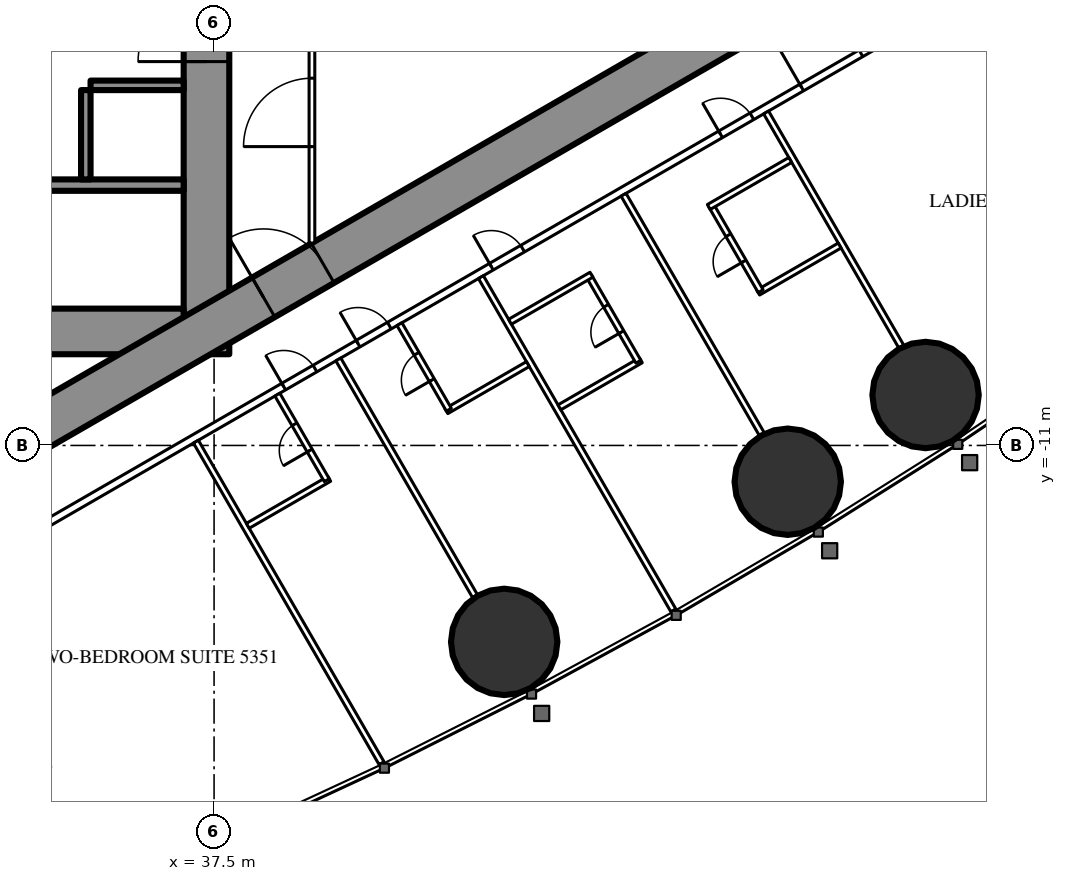
"""IFC4 building model, lengths in metres.
Left out: names, types, materials, properties, quantities, classifications, styles, units other than length and angle.
Written with IfcOpenShell. Run it as: python <this file> out.ifc"""

import sys

from ifc_helpers import new_model, si_unit, direction, frame, frame_2d, origin, origin_2d, place, context, subcontext, project, spatial, rectangle, circle, extrude, element, fill, save


model = new_model("IFC4")
c1 = context("Model", 3, precision=1e-05, world=origin(), true_north=direction((0.0, 1.0)))
c2 = subcontext(c1, "Body", "Model", "MODEL_VIEW")
j1 = project(units=[si_unit("LENGTHUNIT", "METRE"), si_unit("PLANEANGLEUNIT", "RADIAN")], contexts=[c1])
p1 = place(None, origin())
s1 = spatial("IfcSite", under=j1, at=p1, CompositionType="ELEMENT")
p2 = place(p1, origin())
s2 = spatial("IfcBuilding", under=s1, at=p2, CompositionType="ELEMENT")
p3 = place(p2, frame((0.0, 0.0, 198.3)))
s3 = spatial("IfcBuildingStorey", under=s2, at=p3, CompositionType="ELEMENT", Elevation=198.3)
for number, where, z_axis, x_axis in (
    (1, (45.134, -16.168, 0.0), (0.0, 0.0, 1.0), (1.0, 0.0, 0.0)),
    (2, (52.594, -11.955, 0.0), (0.0, 0.0, 1.0), (1.0, 0.0, 0.0)),
    (3, (56.221, -9.672, 0.0), (0.0, 0.0, 1.0), (1.0, 0.0, 0.0)),
):
    element("IfcColumn", number, at=place(p3, frame(where, z_axis=z_axis, x_axis=x_axis)), inside=s3, PredefinedType="COLUMN", context=c2, shape_type="SweptSolid", body=[
        extrude(circle(Radius=1.4, at=origin_2d()), origin(), (0.0, 0.0, 1.0), 3.5),
    ])
p4 = place(p3, frame((37.3, -8.6, 0.0), z_axis=(0.0, 0.0, 1.0), x_axis=(0.0, 1.0, 0.0)))
e4 = element("IfcWall", 4, at=p4, inside=s3, PredefinedType="SHEAR", context=c2, shape_type="SweptSolid", body=[
    extrude(rectangle(XDim=17.2, YDim=1.2, at=frame_2d((8.6, 0.0))), origin(), (0.0, 0.0, 1.0), 3.5),
])
p5 = place(p4, frame((7.7, 0.0, 0.0)))
e5 = element("IfcOpeningElement", 5, at=p5, cuts=e4, PredefinedType="OPENING", context=c2, shape_type="SweptSolid", body=[
    extrude(rectangle(XDim=1.8, YDim=2.2, at=frame_2d((0.9, 1.1))), frame((0.0, 0.61, 0.0), z_axis=(0.0, -1.0, 0.0), x_axis=(1.0, 0.0, 0.0)), (0.0, 0.0, 1.0), 1.22),
])
p6 = place(p3, frame((28.3, -8.0, 0.0), z_axis=(0.0, 0.0, 1.0), x_axis=(1.0, 0.0, 0.0)))
e6 = element("IfcWall", 6, at=p6, inside=s3, PredefinedType="SHEAR", context=c2, shape_type="SweptSolid", body=[
    extrude(rectangle(XDim=8.4, YDim=1.2, at=frame_2d((4.2, 0.0))), origin(), (0.0, 0.0, 1.0), 3.5),
])
p7 = place(p6, frame((0.25, 0.0, 0.0)))
e7 = element("IfcOpeningElement", 7, at=p7, cuts=e6, PredefinedType="OPENING", context=c2, shape_type="SweptSolid", body=[
    extrude(rectangle(XDim=1.0, YDim=2.2, at=frame_2d((0.5, 1.1))), frame((0.0, 0.61, 0.0), z_axis=(0.0, -1.0, 0.0), x_axis=(1.0, 0.0, 0.0)), (0.0, 0.0, 1.0), 1.22),
])
p8 = place(p3, frame((28.3, -4.15, 0.0), z_axis=(0.0, 0.0, 1.0), x_axis=(1.0, 0.0, 0.0)))
e8 = element("IfcWall", 8, at=p8, inside=s3, PredefinedType="SHEAR", context=c2, shape_type="SweptSolid", body=[
    extrude(rectangle(XDim=8.4, YDim=0.3, at=frame_2d((4.2, 0.0))), origin(), (0.0, 0.0, 1.0), 3.5),
])
p9 = place(p3, frame((34.125, -4.0, 0.0), z_axis=(0.0, 0.0, 1.0), x_axis=(0.0, 1.0, 0.0)))
e9 = element("IfcWall", 9, at=p9, inside=s3, PredefinedType="SHEAR", context=c2, shape_type="SweptSolid", body=[
    extrude(rectangle(XDim=2.35, YDim=0.25, at=frame_2d((1.175, 0.0))), origin(), (0.0, 0.0, 1.0), 3.5),
])
p10 = place(p3, frame((34.25, -1.525, 0.0), z_axis=(0.0, 0.0, 1.0), x_axis=(1.0, 0.0, 0.0)))
e10 = element("IfcWall", 10, at=p10, inside=s3, PredefinedType="SHEAR", context=c2, shape_type="SweptSolid", body=[
    extrude(rectangle(XDim=2.45, YDim=0.25, at=frame_2d((1.225, 0.0))), origin(), (0.0, 0.0, 1.0), 3.5),
])
p11 = place(p3, frame((27.2, -13.8, 0.0), z_axis=(0.0, 0.0, 1.0), x_axis=(0.866027159892, 0.499996958321, 0.0)))
e11 = element("IfcWall", 11, at=p11, inside=s3, PredefinedType="SHEAR", context=c2, shape_type="SweptSolid", body=[
    extrude(rectangle(XDim=27.947, YDim=1.2, at=frame_2d((13.973, 0.0))), origin(), (0.0, 0.0, 1.0), 3.5),
])
p12 = place(p11, frame((4.6, 0.0, 0.0)))
e12 = element("IfcOpeningElement", 12, at=p12, cuts=e11, PredefinedType="OPENING", context=c2, shape_type="SweptSolid", body=[
    extrude(rectangle(XDim=1.0, YDim=2.2, at=frame_2d((0.5, 1.1))), frame((0.0, 0.61, 0.0), z_axis=(0.0, -1.0, 0.0), x_axis=(1.0, 0.0, 0.0)), (0.0, 0.0, 1.0), 1.22),
])
p13 = place(p11, frame((13.395, 0.0, 0.0)))
e13 = element("IfcOpeningElement", 13, at=p13, cuts=e11, PredefinedType="OPENING", context=c2, shape_type="SweptSolid", body=[
    extrude(rectangle(XDim=1.8, YDim=2.2, at=frame_2d((0.9, 1.1))), frame((0.0, 0.61, 0.0), z_axis=(0.0, -1.0, 0.0), x_axis=(1.0, 0.0, 0.0)), (0.0, 0.0, 1.0), 1.22),
])
p14 = place(p3, frame((27.959, -16.017, 0.0), z_axis=(0.0, 0.0, 1.0), x_axis=(0.866024151371, 0.500002169237, 0.0)))
e14 = element("IfcWall", 14, at=p14, inside=s3, PredefinedType="PARTITIONING", context=c2, shape_type="SweptSolid", body=[
    extrude(rectangle(XDim=32.034, YDim=0.2, at=frame_2d((16.017, 0.0))), origin(), (0.0, 0.0, 1.0), 3.25),
])
p15 = place(p14, frame((0.6, 0.0, 0.0)))
e15 = element("IfcOpeningElement", 15, at=p15, cuts=e14, PredefinedType="OPENING", context=c2, shape_type="SweptSolid", body=[
    extrude(rectangle(XDim=0.95, YDim=2.2, at=frame_2d((0.475, 1.1))), frame((0.0, 0.11, 0.0), z_axis=(0.0, -1.0, 0.0), x_axis=(1.0, 0.0, 0.0)), (0.0, 0.0, 1.0), 0.22),
])
p16 = place(p14, frame((13.132, 0.0, 0.0)))
e16 = element("IfcOpeningElement", 16, at=p16, cuts=e14, PredefinedType="OPENING", context=c2, shape_type="SweptSolid", body=[
    extrude(rectangle(XDim=0.95, YDim=2.2, at=frame_2d((0.475, 1.1))), frame((0.0, 0.11, 0.0), z_axis=(0.0, -1.0, 0.0), x_axis=(1.0, 0.0, 0.0)), (0.0, 0.0, 1.0), 0.22),
])
p17 = place(p14, frame((15.391, 0.0, 0.0)))
e17 = element("IfcOpeningElement", 17, at=p17, cuts=e14, PredefinedType="OPENING", context=c2, shape_type="SweptSolid", body=[
    extrude(rectangle(XDim=0.95, YDim=2.2, at=frame_2d((0.475, 1.1))), frame((0.0, 0.11, 0.0), z_axis=(0.0, -1.0, 0.0), x_axis=(1.0, 0.0, 0.0)), (0.0, 0.0, 1.0), 0.22),
])
p18 = place(p14, frame((19.441, 0.0, 0.0)))
e18 = element("IfcOpeningElement", 18, at=p18, cuts=e14, PredefinedType="OPENING", context=c2, shape_type="SweptSolid", body=[
    extrude(rectangle(XDim=0.95, YDim=2.2, at=frame_2d((0.475, 1.1))), frame((0.0, 0.11, 0.0), z_axis=(0.0, -1.0, 0.0), x_axis=(1.0, 0.0, 0.0)), (0.0, 0.0, 1.0), 0.22),
])
p19 = place(p14, frame((26.406, 0.0, 0.0)))
e19 = element("IfcOpeningElement", 19, at=p19, cuts=e14, PredefinedType="OPENING", context=c2, shape_type="SweptSolid", body=[
    extrude(rectangle(XDim=0.95, YDim=2.2, at=frame_2d((0.475, 1.1))), frame((0.0, 0.11, 0.0), z_axis=(0.0, -1.0, 0.0), x_axis=(1.0, 0.0, 0.0)), (0.0, 0.0, 1.0), 0.22),
])
p20 = place(p14, frame((28.87, 0.0, 0.0)))
e20 = element("IfcOpeningElement", 20, at=p20, cuts=e14, PredefinedType="OPENING", context=c2, shape_type="SweptSolid", body=[
    extrude(rectangle(XDim=1.8, YDim=2.2, at=frame_2d((0.9, 1.1))), frame((0.0, 0.11, 0.0), z_axis=(0.0, -1.0, 0.0), x_axis=(1.0, 0.0, 0.0)), (0.0, 0.0, 1.0), 0.22),
])
p21 = place(p3, frame((37.022, -10.9, 0.0), z_axis=(0.0, 0.0, 1.0), x_axis=(0.499998620953, -0.866026199976, 0.0)))
e21 = element("IfcWall", 21, at=p21, inside=s3, PredefinedType="PARTITIONING", context=c2, shape_type="SweptSolid", body=[
    extrude(rectangle(XDim=9.77, YDim=0.15, at=frame_2d((4.885, 0.0))), origin(), (0.0, 0.0, 1.0), 3.25),
])
p22 = place(p3, frame((40.769, -8.737, 0.0), z_axis=(0.0, 0.0, 1.0), x_axis=(0.500013115284, -0.866017831539, 0.0)))
e22 = element("IfcWall", 22, at=p22, inside=s3, PredefinedType="PARTITIONING", context=c2, shape_type="SweptSolid", body=[
    extrude(rectangle(XDim=7.198, YDim=0.15, at=frame_2d((3.599, 0.0))), origin(), (0.0, 0.0, 1.0), 2.3),
])
p23 = place(p3, frame((44.521, -6.571, 0.0), z_axis=(0.0, 0.0, 1.0), x_axis=(0.500010457486, -0.866019366068, 0.0)))
e23 = element("IfcWall", 23, at=p23, inside=s3, PredefinedType="PARTITIONING", context=c2, shape_type="SweptSolid", body=[
    extrude(rectangle(XDim=10.126, YDim=0.15, at=frame_2d((5.063, 0.0))), origin(), (0.0, 0.0, 1.0), 3.25),
])
p24 = place(p3, frame((48.275, -4.404, 0.0), z_axis=(0.0, 0.0, 1.0), x_axis=(0.500006004368, -0.866021937133, 0.0)))
e24 = element("IfcWall", 24, at=p24, inside=s3, PredefinedType="PARTITIONING", context=c2, shape_type="SweptSolid", body=[
    extrude(rectangle(XDim=7.279, YDim=0.15, at=frame_2d((3.64, 0.0))), origin(), (0.0, 0.0, 1.0), 2.3),
])
p25 = place(p3, frame((52.025, -2.238, 0.0), z_axis=(0.0, 0.0, 1.0), x_axis=(0.499983785035, -0.866034765296, 0.0)))
e25 = element("IfcWall", 25, at=p25, inside=s3, PredefinedType="PARTITIONING", context=c2, shape_type="SweptSolid", body=[
    extrude(rectangle(XDim=7.116, YDim=0.15, at=frame_2d((3.558, 0.0))), origin(), (0.0, 0.0, 1.0), 2.3),
])
p26 = place(p3, frame((38.387, -13.115, 0.0), z_axis=(0.0, 0.0, 1.0), x_axis=(0.866073894602, 0.499916002032, 0.0)))
e26 = element("IfcWall", 26, at=p26, inside=s3, PredefinedType="PARTITIONING", context=c2, shape_type="SweptSolid", body=[
    extrude(rectangle(XDim=2.475, YDim=0.15, at=frame_2d((1.238, 0.0))), origin(), (0.0, 0.0, 1.0), 3.25),
])
p27 = place(p3, frame((39.166, -9.663, 0.0), z_axis=(0.0, 0.0, 1.0), x_axis=(0.500006934395, -0.866021400173, 0.0)))
e27 = element("IfcWall", 27, at=p27, inside=s3, PredefinedType="PARTITIONING", context=c2, shape_type="SweptSolid", body=[
    extrude(rectangle(XDim=2.6, YDim=0.15, at=frame_2d((1.3, 0.0))), origin(), (0.0, 0.0, 1.0), 3.25),
])
p28 = place(p27, frame((0.9, 0.0, 0.0)))
e28 = element("IfcOpeningElement", 28, at=p28, cuts=e27, PredefinedType="OPENING", context=c2, shape_type="SweptSolid", body=[
    extrude(rectangle(XDim=0.8, YDim=2.2, at=frame_2d((0.4, 1.1))), frame((0.0, 0.085, 0.0), z_axis=(0.0, -1.0, 0.0), x_axis=(1.0, 0.0, 0.0)), (0.0, 0.0, 1.0), 0.17),
])
p29 = place(p3, frame((43.613, -10.097, 0.0), z_axis=(0.0, 0.0, 1.0), x_axis=(0.866031185235, 0.4999899861, 0.0)))
e29 = element("IfcWall", 29, at=p29, inside=s3, PredefinedType="PARTITIONING", context=c2, shape_type="SweptSolid", body=[
    extrude(rectangle(XDim=2.475, YDim=0.15, at=frame_2d((1.238, 0.0))), origin(), (0.0, 0.0, 1.0), 3.25),
])
p30 = place(p3, frame((42.378, -7.808, 0.0), z_axis=(0.0, 0.0, 1.0), x_axis=(0.500006934395, -0.866021400173, 0.0)))
e30 = element("IfcWall", 30, at=p30, inside=s3, PredefinedType="PARTITIONING", context=c2, shape_type="SweptSolid", body=[
    extrude(rectangle(XDim=2.6, YDim=0.15, at=frame_2d((1.3, 0.0))), origin(), (0.0, 0.0, 1.0), 3.25),
])
p31 = place(p30, frame((0.9, 0.0, 0.0)))
e31 = element("IfcOpeningElement", 31, at=p31, cuts=e30, PredefinedType="OPENING", context=c2, shape_type="SweptSolid", body=[
    extrude(rectangle(XDim=0.8, YDim=2.2, at=frame_2d((0.4, 1.1))), frame((0.0, 0.085, 0.0), z_axis=(0.0, -1.0, 0.0), x_axis=(1.0, 0.0, 0.0)), (0.0, 0.0, 1.0), 0.17),
])
p32 = place(p3, frame((46.586, -9.997, 0.0), z_axis=(0.0, 0.0, 1.0), x_axis=(0.866006523861, 0.500032699561, 0.0)))
e32 = element("IfcWall", 32, at=p32, inside=s3, PredefinedType="PARTITIONING", context=c2, shape_type="SweptSolid", body=[
    extrude(rectangle(XDim=2.475, YDim=0.15, at=frame_2d((1.237, 0.0))), origin(), (0.0, 0.0, 1.0), 3.25),
])
p33 = place(p3, frame((47.365, -6.546, 0.0), z_axis=(0.0, 0.0, 1.0), x_axis=(0.500006934395, -0.866021400173, 0.0)))
e33 = element("IfcWall", 33, at=p33, inside=s3, PredefinedType="PARTITIONING", context=c2, shape_type="SweptSolid", body=[
    extrude(rectangle(XDim=2.6, YDim=0.15, at=frame_2d((1.3, 0.0))), origin(), (0.0, 0.0, 1.0), 3.25),
])
p34 = place(p33, frame((0.9, 0.0, 0.0)))
e34 = element("IfcOpeningElement", 34, at=p34, cuts=e33, PredefinedType="OPENING", context=c2, shape_type="SweptSolid", body=[
    extrude(rectangle(XDim=0.8, YDim=2.2, at=frame_2d((0.4, 1.1))), frame((0.0, 0.085, 0.0), z_axis=(0.0, -1.0, 0.0), x_axis=(1.0, 0.0, 0.0)), (0.0, 0.0, 1.0), 0.17),
])
for number, where, z_axis, x_axis in (
    (35, (45.286, -7.746, 0.0), (0.0, 0.0, 1.0), (0.866, 0.5, 0.0)),
    (36, (51.817, -6.978, 0.0), (0.0, 0.0, 1.0), (0.866, 0.5, 0.0)),
):
    element("IfcWall", number, at=place(p3, frame(where, z_axis=z_axis, x_axis=x_axis)), inside=s3, PredefinedType="PARTITIONING", context=c2, shape_type="SweptSolid", body=[
        extrude(rectangle(XDim=2.475, YDim=0.15, at=frame_2d((1.237, 0.0))), origin(), (0.0, 0.0, 1.0), 3.25),
    ])
p35 = place(p3, frame((50.582, -4.688, 0.0), z_axis=(0.0, 0.0, 1.0), x_axis=(0.500006934395, -0.866021400173, 0.0)))
e37 = element("IfcWall", 37, at=p35, inside=s3, PredefinedType="PARTITIONING", context=c2, shape_type="SweptSolid", body=[
    extrude(rectangle(XDim=2.6, YDim=0.15, at=frame_2d((1.3, 0.0))), origin(), (0.0, 0.0, 1.0), 3.25),
])
p36 = place(p35, frame((0.9, 0.0, 0.0)))
e38 = element("IfcOpeningElement", 38, at=p36, cuts=e37, PredefinedType="OPENING", context=c2, shape_type="SweptSolid", body=[
    extrude(rectangle(XDim=0.8, YDim=2.2, at=frame_2d((0.4, 1.1))), frame((0.0, 0.085, 0.0), z_axis=(0.0, -1.0, 0.0), x_axis=(1.0, 0.0, 0.0)), (0.0, 0.0, 1.0), 0.17),
])
p37 = place(p3, frame((50.517, -4.726, 0.0), z_axis=(0.0, 0.0, 1.0), x_axis=(0.866031185235, 0.4999899861, 0.0)))
e39 = element("IfcWall", 39, at=p37, inside=s3, PredefinedType="PARTITIONING", context=c2, shape_type="SweptSolid", body=[
    extrude(rectangle(XDim=2.475, YDim=0.15, at=frame_2d((1.238, 0.0))), origin(), (0.0, 0.0, 1.0), 3.25),
])
p38 = place(p3, frame((40.075, -5.674, 0.0), z_axis=(0.0, 0.0, 1.0), x_axis=(0.0, 1.0, 0.0)))
e40 = element("IfcWall", 40, at=p38, inside=s3, PredefinedType="PARTITIONING", context=c2, shape_type="SweptSolid", body=[
    extrude(rectangle(XDim=6.874, YDim=0.15, at=frame_2d((3.437, 0.0))), origin(), (0.0, 0.0, 1.0), 3.25),
])
p39 = place(p38, frame((2.537, 0.0, 0.0)))
e41 = element("IfcOpeningElement", 41, at=p39, cuts=e40, PredefinedType="OPENING", context=c2, shape_type="SweptSolid", body=[
    extrude(rectangle(XDim=1.8, YDim=2.2, at=frame_2d((0.9, 1.1))), frame((0.0, 0.085, 0.0), z_axis=(0.0, -1.0, 0.0), x_axis=(1.0, 0.0, 0.0)), (0.0, 0.0, 1.0), 0.17),
])
p40 = place(p28, origin())
e42 = element("IfcDoor", 42, at=p40, inside=s3, OperationType="SINGLE_SWING_RIGHT", PredefinedType="DOOR", context=c2, shape_type="SweptSolid", body=[
    extrude(rectangle(XDim=0.8, YDim=2.2, at=frame_2d((0.4, 1.1))), frame((0.0, 0.025, 0.0), z_axis=(0.0, -1.0, 0.0), x_axis=(1.0, 0.0, 0.0)), (0.0, 0.0, 1.0), 0.05),
])
fill(e28, e42)
p41 = place(p16, origin())
e43 = element("IfcDoor", 43, at=p41, inside=s3, OperationType="SINGLE_SWING_LEFT", PredefinedType="DOOR", context=c2, shape_type="SweptSolid", body=[
    extrude(rectangle(XDim=0.95, YDim=2.2, at=frame_2d((0.475, 1.1))), frame((0.0, 0.025, 0.0), z_axis=(0.0, -1.0, 0.0), x_axis=(1.0, 0.0, 0.0)), (0.0, 0.0, 1.0), 0.05),
])
fill(e16, e43)
p42 = place(p31, origin())
e44 = element("IfcDoor", 44, at=p42, inside=s3, OperationType="SINGLE_SWING_RIGHT", PredefinedType="DOOR", context=c2, shape_type="SweptSolid", body=[
    extrude(rectangle(XDim=0.8, YDim=2.2, at=frame_2d((0.4, 1.1))), frame((0.0, 0.025, 0.0), z_axis=(0.0, -1.0, 0.0), x_axis=(1.0, 0.0, 0.0)), (0.0, 0.0, 1.0), 0.05),
])
fill(e31, e44)
p43 = place(p17, origin())
e45 = element("IfcDoor", 45, at=p43, inside=s3, OperationType="SINGLE_SWING_LEFT", PredefinedType="DOOR", context=c2, shape_type="SweptSolid", body=[
    extrude(rectangle(XDim=0.95, YDim=2.2, at=frame_2d((0.475, 1.1))), frame((0.0, 0.025, 0.0), z_axis=(0.0, -1.0, 0.0), x_axis=(1.0, 0.0, 0.0)), (0.0, 0.0, 1.0), 0.05),
])
fill(e17, e45)
p44 = place(p34, origin())
e46 = element("IfcDoor", 46, at=p44, inside=s3, OperationType="SINGLE_SWING_RIGHT", PredefinedType="DOOR", context=c2, shape_type="SweptSolid", body=[
    extrude(rectangle(XDim=0.8, YDim=2.2, at=frame_2d((0.4, 1.1))), frame((0.0, 0.025, 0.0), z_axis=(0.0, -1.0, 0.0), x_axis=(1.0, 0.0, 0.0)), (0.0, 0.0, 1.0), 0.05),
])
fill(e34, e46)
p45 = place(p18, origin())
e47 = element("IfcDoor", 47, at=p45, inside=s3, OperationType="SINGLE_SWING_LEFT", PredefinedType="DOOR", context=c2, shape_type="SweptSolid", body=[
    extrude(rectangle(XDim=0.95, YDim=2.2, at=frame_2d((0.475, 1.1))), frame((0.0, 0.025, 0.0), z_axis=(0.0, -1.0, 0.0), x_axis=(1.0, 0.0, 0.0)), (0.0, 0.0, 1.0), 0.05),
])
fill(e18, e47)
p46 = place(p36, origin())
e48 = element("IfcDoor", 48, at=p46, inside=s3, OperationType="SINGLE_SWING_RIGHT", PredefinedType="DOOR", context=c2, shape_type="SweptSolid", body=[
    extrude(rectangle(XDim=0.8, YDim=2.2, at=frame_2d((0.4, 1.1))), frame((0.0, 0.025, 0.0), z_axis=(0.0, -1.0, 0.0), x_axis=(1.0, 0.0, 0.0)), (0.0, 0.0, 1.0), 0.05),
])
fill(e38, e48)
p47 = place(p19, origin())
e49 = element("IfcDoor", 49, at=p47, inside=s3, OperationType="SINGLE_SWING_LEFT", PredefinedType="DOOR", context=c2, shape_type="SweptSolid", body=[
    extrude(rectangle(XDim=0.95, YDim=2.2, at=frame_2d((0.475, 1.1))), frame((0.0, 0.025, 0.0), z_axis=(0.0, -1.0, 0.0), x_axis=(1.0, 0.0, 0.0)), (0.0, 0.0, 1.0), 0.05),
])
fill(e19, e49)
p48 = place(p20, origin())
e50 = element("IfcDoor", 50, at=p48, inside=s3, OperationType="DOUBLE_DOOR_SINGLE_SWING", PredefinedType="DOOR", context=c2, shape_type="SweptSolid", body=[
    extrude(rectangle(XDim=1.8, YDim=2.2, at=frame_2d((0.9, 1.1))), frame((0.0, 0.025, 0.0), z_axis=(0.0, -1.0, 0.0), x_axis=(1.0, 0.0, 0.0)), (0.0, 0.0, 1.0), 0.05),
])
fill(e20, e50)
p49 = place(p39, origin())
e51 = element("IfcDoor", 51, at=p49, inside=s3, OperationType="DOUBLE_DOOR_SINGLE_SWING", PredefinedType="DOOR", context=c2, shape_type="SweptSolid", body=[
    extrude(rectangle(XDim=1.8, YDim=2.2, at=frame_2d((0.9, 1.1))), frame((0.0, 0.025, 0.0), z_axis=(0.0, -1.0, 0.0), x_axis=(1.0, 0.0, 0.0)), (0.0, 0.0, 1.0), 0.05),
])
fill(e41, e51)
p50 = place(p13, origin())
e52 = element("IfcDoor", 52, at=p50, inside=s3, OperationType="DOUBLE_DOOR_SINGLE_SWING", PredefinedType="DOOR", context=c2, shape_type="SweptSolid", body=[
    extrude(rectangle(XDim=1.8, YDim=2.2, at=frame_2d((0.9, 1.1))), frame((0.0, 0.025, 0.0), z_axis=(0.0, -1.0, 0.0), x_axis=(1.0, 0.0, 0.0)), (0.0, 0.0, 1.0), 0.05),
])
fill(e13, e52)
p51 = place(p5, origin())
e53 = element("IfcDoor", 53, at=p51, inside=s3, OperationType="DOUBLE_DOOR_SINGLE_SWING", PredefinedType="DOOR", context=c2, shape_type="SweptSolid", body=[
    extrude(rectangle(XDim=1.8, YDim=2.2, at=frame_2d((0.9, 1.1))), frame((0.0, 0.025, 0.0), z_axis=(0.0, -1.0, 0.0), x_axis=(1.0, 0.0, 0.0)), (0.0, 0.0, 1.0), 0.05),
])
fill(e5, e53)
save(model, sys.argv[1])
